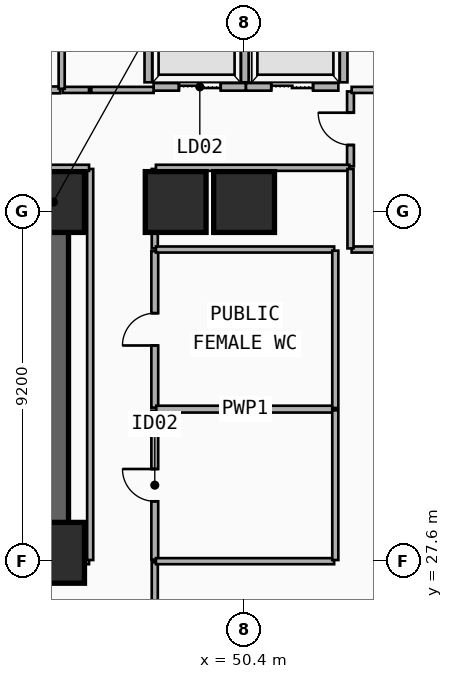
"""IFC4 building model, lengths in metres.
Left out: names, types, materials, properties, quantities, classifications, styles, units other than length and angle.
Written with IfcOpenShell. Run it as: python <this file> out.ifc"""

import sys

from ifc_helpers import new_model, si_unit, direction, frame, frame_2d, origin, origin_2d, place, context, subcontext, project, spatial, rectangle, extrude, element, fill, save


model = new_model("IFC4")
c1 = context("Model", 3, precision=1e-05, world=origin(), true_north=direction((0.0, 1.0)))
c2 = subcontext(c1, "Body", "Model", "MODEL_VIEW")
j1 = project(units=[si_unit("LENGTHUNIT", "METRE"), si_unit("PLANEANGLEUNIT", "RADIAN")], contexts=[c1])
p1 = place(None, origin())
s1 = spatial("IfcSite", under=j1, at=p1, CompositionType="ELEMENT")
p2 = place(p1, origin())
s2 = spatial("IfcBuilding", under=s1, at=p2, CompositionType="ELEMENT")
p3 = place(p2, frame((0.0, 0.0, 19.4)))
s3 = spatial("IfcBuildingStorey", under=s2, at=p3, CompositionType="ELEMENT", Elevation=19.4)
p4 = place(p3, frame((12.15, 37.05, 0.0), z_axis=(0.0, 0.0, 1.0), x_axis=(1.0, 0.0, 0.0)))
e1 = element("IfcWall", 1, at=p4, inside=s3, PredefinedType="SHEAR", context=c2, shape_type="SweptSolid", body=[
    extrude(rectangle(XDim=33.23, YDim=0.8, at=frame_2d((16.615, 0.0))), origin(), (0.0, 0.0, 1.0), 4.8),
])
p5 = place(p3, frame((45.38, 27.82, 0.0), z_axis=(0.0, 0.0, 1.0), x_axis=(-1.0, 0.0, 0.0)))
e2 = element("IfcWall", 2, at=p5, inside=s3, PredefinedType="SHEAR", context=c2, shape_type="SweptSolid", body=[
    extrude(rectangle(XDim=12.23, YDim=0.8, at=frame_2d((6.115, 0.0))), origin(), (0.0, 0.0, 1.0), 4.8),
])
p6 = place(p5, frame((9.93, 0.0, 0.0)))
e3 = element("IfcOpeningElement", 3, at=p6, cuts=e2, PredefinedType="OPENING", context=c2, shape_type="SweptSolid", body=[
    extrude(rectangle(XDim=1.1, YDim=2.15, at=frame_2d((0.55, 1.075))), frame((0.0, 0.41, 0.0), z_axis=(0.0, -1.0, 0.0), x_axis=(1.0, 0.0, 0.0)), (0.0, 0.0, 1.0), 0.82),
])
p7 = place(p5, frame((6.23, 0.0, 0.0)))
e4 = element("IfcOpeningElement", 4, at=p7, cuts=e2, PredefinedType="OPENING", context=c2, shape_type="SweptSolid", body=[
    extrude(rectangle(XDim=1.1, YDim=2.15, at=frame_2d((0.55, 1.075))), frame((0.0, 0.41, 0.0), z_axis=(0.0, -1.0, 0.0), x_axis=(1.0, 0.0, 0.0)), (0.0, 0.0, 1.0), 0.82),
])
p8 = place(p3, frame((45.38, 28.22, 0.0), z_axis=(0.0, 0.0, 1.0), x_axis=(0.0, 1.0, 0.0)))
e5 = element("IfcWall", 5, at=p8, inside=s3, PredefinedType="SHEAR", context=c2, shape_type="SweptSolid", body=[
    extrude(rectangle(XDim=8.43, YDim=0.8, at=frame_2d((4.215, 0.0))), origin(), (0.0, 0.0, 1.0), 4.8),
])
for number, where, z_axis, x_axis in (
    (6, (45.4, 27.82, 0.0), (0.0, 0.0, 1.0), (1.0, 0.0, 0.0)),
    (7, (45.4, 37.05, 0.0), (0.0, 0.0, 1.0), (1.0, 0.0, 0.0)),
    (8, (48.6, 37.05, 0.0), (0.0, 0.0, 1.0), (1.0, 0.0, 0.0)),
    (9, (50.4, 37.05, 0.0), (0.0, 0.0, 1.0), (1.0, 0.0, 0.0)),
):
    element("IfcColumn", number, at=place(p3, frame(where, z_axis=z_axis, x_axis=x_axis)), inside=s3, PredefinedType="COLUMN", context=c2, shape_type="SweptSolid", body=[
        extrude(rectangle(XDim=1.6, YDim=1.6, at=origin_2d()), origin(), (0.0, 0.0, 1.0), 4.8),
    ])
p9 = place(p3, frame((48.02, 40.08, 0.0), z_axis=(0.0, 0.0, 1.0), x_axis=(1.0, 0.0, 0.0)))
e10 = element("IfcWall", 10, at=p9, inside=s3, PredefinedType="PARTITIONING", context=c2, shape_type="SweptSolid", body=[
    extrude(rectangle(XDim=2.43, YDim=0.2, at=frame_2d((1.215, 0.0))), origin(), (0.0, 0.0, 1.0), 4.5),
])
p10 = place(p9, frame((0.665, 0.0, 0.0)))
e11 = element("IfcOpeningElement", 11, at=p10, cuts=e10, PredefinedType="OPENING", context=c2, shape_type="SweptSolid", body=[
    extrude(rectangle(XDim=1.1, YDim=2.15, at=frame_2d((0.55, 1.075))), frame((0.0, 0.11, 0.0), z_axis=(0.0, -1.0, 0.0), x_axis=(1.0, 0.0, 0.0)), (0.0, 0.0, 1.0), 0.22),
])
for number, where, z_axis, x_axis in (
    (12, (47.88, 40.2, 0.0), (0.0, 0.0, 1.0), (0.0, 1.0, 0.0)),
    (13, (50.42, 40.2, 0.0), (0.0, 0.0, 1.0), (0.0, 1.0, 0.0)),
):
    element("IfcWall", number, at=place(p3, frame(where, z_axis=z_axis, x_axis=x_axis)), inside=s3, PredefinedType="PARTITIONING", context=c2, shape_type="SweptSolid", body=[
        extrude(rectangle(XDim=2.6, YDim=0.2, at=frame_2d((1.3, 0.0))), origin(), (0.0, 0.0, 1.0), 4.5),
    ])
p11 = place(p3, frame((50.45, 40.08, 0.0), z_axis=(0.0, 0.0, 1.0), x_axis=(1.0, 0.0, 0.0)))
e14 = element("IfcWall", 14, at=p11, inside=s3, PredefinedType="PARTITIONING", context=c2, shape_type="SweptSolid", body=[
    extrude(rectangle(XDim=2.43, YDim=0.2, at=frame_2d((1.215, 0.0))), origin(), (0.0, 0.0, 1.0), 4.5),
])
p12 = place(p11, frame((0.665, 0.0, 0.0)))
e15 = element("IfcOpeningElement", 15, at=p12, cuts=e14, PredefinedType="OPENING", context=c2, shape_type="SweptSolid", body=[
    extrude(rectangle(XDim=1.1, YDim=2.15, at=frame_2d((0.55, 1.075))), frame((0.0, 0.11, 0.0), z_axis=(0.0, -1.0, 0.0), x_axis=(1.0, 0.0, 0.0)), (0.0, 0.0, 1.0), 0.22),
])
p13 = place(p3, frame((53.02, 40.2, 0.0), z_axis=(0.0, 0.0, 1.0), x_axis=(0.0, 1.0, 0.0)))
e16 = element("IfcWall", 16, at=p13, inside=s3, PredefinedType="PARTITIONING", context=c2, shape_type="SweptSolid", body=[
    extrude(rectangle(XDim=2.6, YDim=0.2, at=frame_2d((1.3, 0.0))), origin(), (0.0, 0.0, 1.0), 4.5),
])
p14 = place(p3, frame((48.05, 27.64, 0.0), z_axis=(0.0, 0.0, 1.0), x_axis=(0.0, 1.0, 0.0)))
e17 = element("IfcWall", 17, at=p14, inside=s3, PredefinedType="PLUMBINGWALL", context=c2, shape_type="SweptSolid", body=[
    extrude(rectangle(XDim=3.92, YDim=0.18, at=frame_2d((1.96, 0.0))), origin(), (0.0, 0.0, 1.0), 4.5),
])
p15 = place(p14, frame((1.535, 0.0, 0.0)))
e18 = element("IfcOpeningElement", 18, at=p15, cuts=e17, PredefinedType="OPENING", context=c2, shape_type="SweptSolid", body=[
    extrude(rectangle(XDim=0.85, YDim=2.1, at=frame_2d((0.425, 1.05))), frame((0.0, 0.1, 0.0), z_axis=(0.0, -1.0, 0.0), x_axis=(1.0, 0.0, 0.0)), (0.0, 0.0, 1.0), 0.2),
])
p16 = place(p3, frame((48.05, 31.64, 0.0), z_axis=(0.0, 0.0, 1.0), x_axis=(0.0, 1.0, 0.0)))
e19 = element("IfcWall", 19, at=p16, inside=s3, PredefinedType="PLUMBINGWALL", context=c2, shape_type="SweptSolid", body=[
    extrude(rectangle(XDim=4.12, YDim=0.18, at=frame_2d((2.06, 0.0))), origin(), (0.0, 0.0, 1.0), 4.5),
])
p17 = place(p16, frame((1.635, 0.0, 0.0)))
e20 = element("IfcOpeningElement", 20, at=p17, cuts=e19, PredefinedType="OPENING", context=c2, shape_type="SweptSolid", body=[
    extrude(rectangle(XDim=0.85, YDim=2.1, at=frame_2d((0.425, 1.05))), frame((0.0, 0.1, 0.0), z_axis=(0.0, -1.0, 0.0), x_axis=(1.0, 0.0, 0.0)), (0.0, 0.0, 1.0), 0.2),
])
p18 = place(p3, frame((12.04, 40.0, 0.0), z_axis=(0.0, 0.0, 1.0), x_axis=(1.0, 0.0, 0.0)))
e21 = element("IfcWall", 21, at=p18, inside=s3, PredefinedType="PLUMBINGWALL", context=c2, shape_type="SweptSolid", body=[
    extrude(rectangle(XDim=33.52, YDim=0.18, at=frame_2d((16.76, 0.0))), origin(), (0.0, 0.0, 1.0), 3.83),
])
p19 = place(p18, frame((16.26, 0.0, 0.0)))
e22 = element("IfcOpeningElement", 22, at=p19, cuts=e21, PredefinedType="OPENING", context=c2, shape_type="SweptSolid", body=[
    extrude(rectangle(XDim=1.0, YDim=2.15, at=frame_2d((0.5, 1.075))), frame((0.0, 0.1, 0.0), z_axis=(0.0, -1.0, 0.0), x_axis=(1.0, 0.0, 0.0)), (0.0, 0.0, 1.0), 0.2),
])
p20 = place(p3, frame((53.2, 37.99, 0.0), z_axis=(0.0, 0.0, 1.0), x_axis=(0.0, 1.0, 0.0)))
e23 = element("IfcWall", 23, at=p20, inside=s3, PredefinedType="PLUMBINGWALL", context=c2, shape_type="SweptSolid", body=[
    extrude(rectangle(XDim=1.97, YDim=0.18, at=frame_2d((0.985, 0.0))), origin(), (0.0, 0.0, 1.0), 4.5),
])
p21 = place(p20, frame((0.56, 0.0, 0.0)))
e24 = element("IfcOpeningElement", 24, at=p21, cuts=e23, PredefinedType="OPENING", context=c2, shape_type="SweptSolid", body=[
    extrude(rectangle(XDim=0.85, YDim=2.1, at=frame_2d((0.425, 1.05))), frame((0.0, 0.1, 0.0), z_axis=(0.0, -1.0, 0.0), x_axis=(1.0, 0.0, 0.0)), (0.0, 0.0, 1.0), 0.2),
])
p22 = place(p3, frame((48.09, 31.6, 0.0), z_axis=(0.0, 0.0, 1.0), x_axis=(1.0, 0.0, 0.0)))
e25 = element("IfcWall", 25, at=p22, inside=s3, PredefinedType="PLUMBINGWALL", context=c2, shape_type="SweptSolid", body=[
    extrude(rectangle(XDim=4.67, YDim=0.18, at=frame_2d((2.335, 0.0))), origin(), (0.0, 0.0, 1.0), 4.5),
])
p23 = place(p3, frame((45.41, 27.6, 0.0), z_axis=(0.0, 0.0, 1.0), x_axis=(1.0, 0.0, 0.0)))
e26 = element("IfcWall", 26, at=p23, inside=s3, PredefinedType="PARTITIONING", context=c2, shape_type="SweptSolid", body=[
    extrude(rectangle(XDim=0.91, YDim=0.16, at=frame_2d((0.455, 0.0))), origin(), (0.0, 0.0, 1.0), 3.472),
])
p24 = place(p3, frame((48.05, 25.48, 0.0), z_axis=(0.0, 0.0, 1.0), x_axis=(0.0, 1.0, 0.0)))
e27 = element("IfcWall", 27, at=p24, inside=s3, PredefinedType="PARTITIONING", context=c2, shape_type="SweptSolid", body=[
    extrude(rectangle(XDim=2.09, YDim=0.16, at=frame_2d((1.045, 0.0))), origin(), (0.0, 0.0, 1.0), 4.5),
])
p25 = place(p3, frame((46.38, 40.0, 0.0), z_axis=(0.0, 0.0, 1.0), x_axis=(1.0, 0.0, 0.0)))
e28 = element("IfcWall", 28, at=p25, inside=s3, PredefinedType="PARTITIONING", context=c2, shape_type="SweptSolid", body=[
    extrude(rectangle(XDim=1.64, YDim=0.16, at=frame_2d((0.82, 0.0))), origin(), (0.0, 0.0, 1.0), 4.5),
])
p26 = place(p3, frame((46.35, 27.63, 0.0), z_axis=(0.0, 0.0, 1.0), x_axis=(0.0, 1.0, 0.0)))
e29 = element("IfcWall", 29, at=p26, inside=s3, PredefinedType="PARTITIONING", context=c2, shape_type="SweptSolid", body=[
    extrude(rectangle(XDim=10.29, YDim=0.16, at=frame_2d((5.145, 0.0))), origin(), (0.0, 0.0, 1.0), 4.5),
])
p27 = place(p3, frame((48.05, 35.83, 0.0), z_axis=(0.0, 0.0, 1.0), x_axis=(0.0, 1.0, 0.0)))
e30 = element("IfcWall", 30, at=p27, inside=s3, PredefinedType="PARTITIONING", context=c2, shape_type="SweptSolid", body=[
    extrude(rectangle(XDim=2.09, YDim=0.16, at=frame_2d((1.045, 0.0))), origin(), (0.0, 0.0, 1.0), 4.5),
])
p28 = place(p3, frame((11.28, 37.95, 0.0), z_axis=(0.0, 0.0, 1.0), x_axis=(1.0, 0.0, 0.0)))
e31 = element("IfcWall", 31, at=p28, inside=s3, PredefinedType="PARTITIONING", context=c2, shape_type="SweptSolid", body=[
    extrude(rectangle(XDim=35.04, YDim=0.16, at=frame_2d((17.52, 0.0))), origin(), (0.0, 0.0, 1.0), 3.83),
])
p29 = place(p3, frame((45.63, 40.0, 0.0), z_axis=(0.0, 0.0, 1.0), x_axis=(1.0, 0.0, 0.0)))
e32 = element("IfcWall", 32, at=p29, inside=s3, PredefinedType="PARTITIONING", context=c2, shape_type="SweptSolid", body=[
    extrude(rectangle(XDim=0.69, YDim=0.16, at=frame_2d((0.345, 0.0))), origin(), (0.0, 0.0, 1.0), 3.83),
])
p30 = place(p3, frame((48.08, 37.95, 0.0), z_axis=(0.0, 0.0, 1.0), x_axis=(1.0, 0.0, 0.0)))
e33 = element("IfcWall", 33, at=p30, inside=s3, PredefinedType="PARTITIONING", context=c2, shape_type="SweptSolid", body=[
    extrude(rectangle(XDim=5.09, YDim=0.16, at=frame_2d((2.545, 0.0))), origin(), (0.0, 0.0, 1.0), 4.5),
])
p31 = place(p3, frame((48.08, 27.6, 0.0), z_axis=(0.0, 0.0, 1.0), x_axis=(1.0, 0.0, 0.0)))
e34 = element("IfcWall", 34, at=p31, inside=s3, PredefinedType="PARTITIONING", context=c2, shape_type="SweptSolid", body=[
    extrude(rectangle(XDim=4.69, YDim=0.16, at=frame_2d((2.345, 0.0))), origin(), (0.0, 0.0, 1.0), 4.5),
])
p32 = place(p3, frame((52.8, 27.63, 0.0), z_axis=(0.0, 0.0, 1.0), x_axis=(0.0, 1.0, 0.0)))
e35 = element("IfcWall", 35, at=p32, inside=s3, PredefinedType="PARTITIONING", context=c2, shape_type="SweptSolid", body=[
    extrude(rectangle(XDim=3.94, YDim=0.16, at=frame_2d((1.97, 0.0))), origin(), (0.0, 0.0, 1.0), 4.5),
])
p33 = place(p3, frame((48.08, 35.8, 0.0), z_axis=(0.0, 0.0, 1.0), x_axis=(1.0, 0.0, 0.0)))
e36 = element("IfcWall", 36, at=p33, inside=s3, PredefinedType="PARTITIONING", context=c2, shape_type="SweptSolid", body=[
    extrude(rectangle(XDim=4.69, YDim=0.16, at=frame_2d((2.345, 0.0))), origin(), (0.0, 0.0, 1.0), 4.5),
])
p34 = place(p3, frame((52.8, 31.63, 0.0), z_axis=(0.0, 0.0, 1.0), x_axis=(0.0, 1.0, 0.0)))
e37 = element("IfcWall", 37, at=p34, inside=s3, PredefinedType="PARTITIONING", context=c2, shape_type="SweptSolid", body=[
    extrude(rectangle(XDim=4.14, YDim=0.16, at=frame_2d((2.07, 0.0))), origin(), (0.0, 0.0, 1.0), 4.5),
])
for number, where, z_axis, x_axis in (
    (38, (53.23, 35.8, 0.0), (0.0, 0.0, 1.0), (1.0, 0.0, 0.0)),
    (39, (53.23, 40.0, 0.0), (0.0, 0.0, 1.0), (1.0, 0.0, 0.0)),
):
    element("IfcWall", number, at=place(p3, frame(where, z_axis=z_axis, x_axis=x_axis)), inside=s3, PredefinedType="PARTITIONING", context=c2, shape_type="SweptSolid", body=[
        extrude(rectangle(XDim=4.06, YDim=0.16, at=frame_2d((2.03, 0.0))), origin(), (0.0, 0.0, 1.0), 4.5),
    ])
p35 = place(p3, frame((53.2, 35.83, 0.0), z_axis=(0.0, 0.0, 1.0), x_axis=(0.0, 1.0, 0.0)))
e40 = element("IfcWall", 40, at=p35, inside=s3, PredefinedType="PARTITIONING", context=c2, shape_type="SweptSolid", body=[
    extrude(rectangle(XDim=2.09, YDim=0.16, at=frame_2d((1.045, 0.0))), origin(), (0.0, 0.0, 1.0), 4.5),
])
p36 = place(p3, frame((45.6, 40.03, 0.0), z_axis=(0.0, 0.0, 1.0), x_axis=(0.0, 1.0, 0.0)))
e41 = element("IfcWall", 41, at=p36, inside=s3, PredefinedType="PARTITIONING", context=c2, shape_type="SweptSolid", body=[
    extrude(rectangle(XDim=4.86, YDim=0.16, at=frame_2d((2.43, 0.0))), origin(), (0.0, 0.0, 1.0), 3.83),
])
p37 = place(p10, origin())
e42 = element("IfcDoor", 42, at=p37, inside=s3, OperationType="DOUBLE_DOOR_SLIDING", PredefinedType="DOOR", context=c2, shape_type="SweptSolid", body=[
    extrude(rectangle(XDim=1.1, YDim=2.15, at=frame_2d((0.55, 1.075))), frame((0.0, 0.025, 0.0), z_axis=(0.0, -1.0, 0.0), x_axis=(1.0, 0.0, 0.0)), (0.0, 0.0, 1.0), 0.05),
])
fill(e11, e42)
p38 = place(p12, origin())
e43 = element("IfcDoor", 43, at=p38, inside=s3, OperationType="DOUBLE_DOOR_SLIDING", PredefinedType="DOOR", context=c2, shape_type="SweptSolid", body=[
    extrude(rectangle(XDim=1.1, YDim=2.15, at=frame_2d((0.55, 1.075))), frame((0.0, 0.025, 0.0), z_axis=(0.0, -1.0, 0.0), x_axis=(1.0, 0.0, 0.0)), (0.0, 0.0, 1.0), 0.05),
])
fill(e15, e43)
p39 = place(p15, origin())
e44 = element("IfcDoor", 44, at=p39, inside=s3, OperationType="SINGLE_SWING_RIGHT", PredefinedType="DOOR", context=c2, shape_type="SweptSolid", body=[
    extrude(rectangle(XDim=0.85, YDim=2.1, at=frame_2d((0.425, 1.05))), frame((0.0, 0.025, 0.0), z_axis=(0.0, -1.0, 0.0), x_axis=(1.0, 0.0, 0.0)), (0.0, 0.0, 1.0), 0.05),
])
fill(e18, e44)
p40 = place(p17, origin())
e45 = element("IfcDoor", 45, at=p40, inside=s3, OperationType="SINGLE_SWING_LEFT", PredefinedType="DOOR", context=c2, shape_type="SweptSolid", body=[
    extrude(rectangle(XDim=0.85, YDim=2.1, at=frame_2d((0.425, 1.05))), frame((0.0, 0.025, 0.0), z_axis=(0.0, -1.0, 0.0), x_axis=(1.0, 0.0, 0.0)), (0.0, 0.0, 1.0), 0.05),
])
fill(e20, e45)
p41 = place(p21, origin())
e46 = element("IfcDoor", 46, at=p41, inside=s3, OperationType="SINGLE_SWING_RIGHT", PredefinedType="DOOR", context=c2, shape_type="SweptSolid", body=[
    extrude(rectangle(XDim=0.85, YDim=2.1, at=frame_2d((0.425, 1.05))), frame((0.0, 0.025, 0.0), z_axis=(0.0, -1.0, 0.0), x_axis=(1.0, 0.0, 0.0)), (0.0, 0.0, 1.0), 0.05),
])
fill(e24, e46)
save(model, sys.argv[1])
